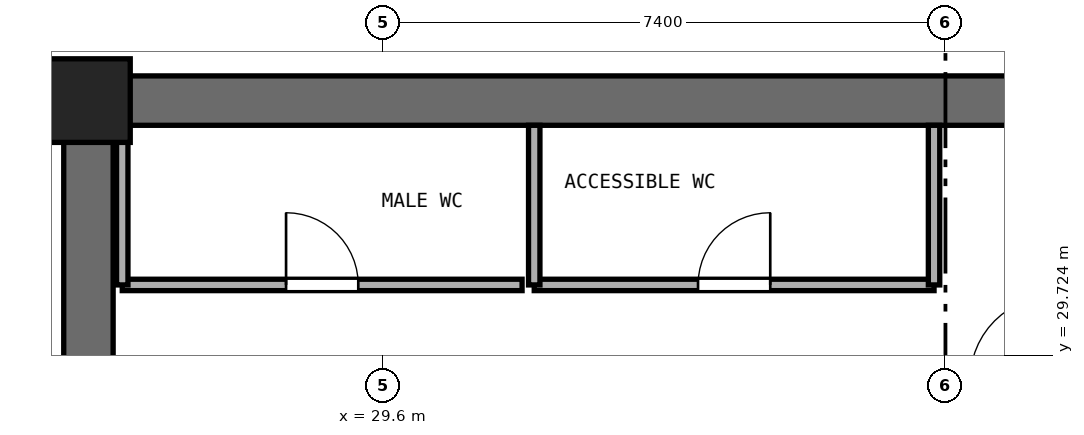
"""IFC4 building model, lengths in metres.
Left out: names, types, materials, properties, quantities, classifications, styles, units other than length and angle.
Written with IfcOpenShell. Run it as: python <this file> out.ifc"""

import sys

from ifc_helpers import new_model, si_unit, direction, frame, frame_2d, origin, origin_2d, place, context, subcontext, project, spatial, rectangle, extrude, element, fill, save


model = new_model("IFC4")
c1 = context("Model", 3, precision=1e-05, world=origin(), true_north=direction((0.0, 1.0)))
c2 = subcontext(c1, "Body", "Model", "MODEL_VIEW")
j1 = project(units=[si_unit("LENGTHUNIT", "METRE"), si_unit("PLANEANGLEUNIT", "RADIAN")], contexts=[c1])
p1 = place(None, origin())
s1 = spatial("IfcSite", under=j1, at=p1, CompositionType="ELEMENT")
p2 = place(p1, origin())
s2 = spatial("IfcBuilding", under=s1, at=p2, CompositionType="ELEMENT")
p3 = place(p2, frame((0.0, 0.0, 15.0)))
s3 = spatial("IfcBuildingStorey", under=s2, at=p3, CompositionType="ELEMENT", Elevation=15.0)
p4 = place(p3, frame((25.4, 33.075, 0.0), z_axis=(0.0, 0.0, 1.0), x_axis=(1.0, 0.0, 0.0)))
e1 = element("IfcWall", 1, at=p4, inside=s3, PredefinedType="SHEAR", context=c2, shape_type="SweptSolid", body=[
    extrude(rectangle(XDim=23.2, YDim=0.65, at=frame_2d((11.6, 0.0))), origin(), (0.0, 0.0, 1.0), 4.68),
])
p5 = place(p3, frame((25.725, 17.65, 0.0), z_axis=(0.0, 0.0, 1.0), x_axis=(0.0, 1.0, 0.0)))
e2 = element("IfcWall", 2, at=p5, inside=s3, PredefinedType="SHEAR", context=c2, shape_type="SweptSolid", body=[
    extrude(rectangle(XDim=15.1, YDim=0.65, at=frame_2d((7.55, 0.0))), origin(), (0.0, 0.0, 1.0), 4.68),
])
p6 = place(p5, frame((6.8, 0.0, 0.0)))
e3 = element("IfcOpeningElement", 3, at=p6, cuts=e2, PredefinedType="OPENING", context=c2, shape_type="SweptSolid", body=[
    extrude(rectangle(XDim=1.5, YDim=2.15, at=frame_2d((0.75, 1.075))), frame((0.0, 0.335, 0.0), z_axis=(0.0, -1.0, 0.0), x_axis=(1.0, 0.0, 0.0)), (0.0, 0.0, 1.0), 0.67),
])
p7 = place(p3, frame((25.725, 33.075, 0.0), z_axis=(0.0, 0.0, 1.0), x_axis=(1.0, 0.0, 0.0)))
e4 = element("IfcColumn", 4, at=p7, inside=s3, PredefinedType="PILASTER", context=c2, shape_type="SweptSolid", body=[
    extrude(rectangle(XDim=1.1, YDim=1.1, at=origin_2d()), origin(), (0.0, 0.0, 1.0), 5.0),
])
p8 = place(p3, frame((26.17, 30.65, 0.0), z_axis=(0.0, 0.0, 1.0), x_axis=(1.0, 0.0, 0.0)))
e5 = element("IfcWall", 5, at=p8, inside=s3, PredefinedType="PARTITIONING", context=c2, shape_type="SweptSolid", body=[
    extrude(rectangle(XDim=5.26, YDim=0.15, at=frame_2d((2.63, 0.0))), origin(), (0.0, 0.0, 1.0), 4.68),
])
p9 = place(p8, frame((2.155, 0.0, 0.0)))
e6 = element("IfcOpeningElement", 6, at=p9, cuts=e5, PredefinedType="OPENING", context=c2, shape_type="SweptSolid", body=[
    extrude(rectangle(XDim=0.95, YDim=2.1, at=frame_2d((0.475, 1.05))), frame((0.0, 0.085, 0.0), z_axis=(0.0, -1.0, 0.0), x_axis=(1.0, 0.0, 0.0)), (0.0, 0.0, 1.0), 0.17),
])
p10 = place(p3, frame((26.17, 30.65, 0.0), z_axis=(0.0, 0.0, 1.0), x_axis=(0.0, 1.0, 0.0)))
e7 = element("IfcWall", 7, at=p10, inside=s3, PredefinedType="PARTITIONING", context=c2, shape_type="SweptSolid", body=[
    extrude(rectangle(XDim=2.1, YDim=0.15, at=frame_2d((1.05, 0.0))), origin(), (0.0, 0.0, 1.0), 4.68),
])
p11 = place(p3, frame((31.59, 30.65, 0.0), z_axis=(0.0, 0.0, 1.0), x_axis=(1.0, 0.0, 0.0)))
e8 = element("IfcWall", 8, at=p11, inside=s3, PredefinedType="PARTITIONING", context=c2, shape_type="SweptSolid", body=[
    extrude(rectangle(XDim=5.26, YDim=0.15, at=frame_2d((2.63, 0.0))), origin(), (0.0, 0.0, 1.0), 4.68),
])
p12 = place(p11, frame((2.155, 0.0, 0.0)))
e9 = element("IfcOpeningElement", 9, at=p12, cuts=e8, PredefinedType="OPENING", context=c2, shape_type="SweptSolid", body=[
    extrude(rectangle(XDim=0.95, YDim=2.1, at=frame_2d((0.475, 1.05))), frame((0.0, 0.085, 0.0), z_axis=(0.0, -1.0, 0.0), x_axis=(1.0, 0.0, 0.0)), (0.0, 0.0, 1.0), 0.17),
])
for number, where, z_axis, x_axis in (
    (10, (31.59, 30.65, 0.0), (0.0, 0.0, 1.0), (0.0, 1.0, 0.0)),
    (11, (36.85, 30.65, 0.0), (0.0, 0.0, 1.0), (0.0, 1.0, 0.0)),
):
    element("IfcWall", number, at=place(p3, frame(where, z_axis=z_axis, x_axis=x_axis)), inside=s3, PredefinedType="PARTITIONING", context=c2, shape_type="SweptSolid", body=[
        extrude(rectangle(XDim=2.1, YDim=0.15, at=frame_2d((1.05, 0.0))), origin(), (0.0, 0.0, 1.0), 4.68),
    ])
p13 = place(p9, origin())
e12 = element("IfcDoor", 12, at=p13, inside=s3, OperationType="SINGLE_SWING_LEFT", PredefinedType="DOOR", context=c2, shape_type="SweptSolid", body=[
    extrude(rectangle(XDim=0.95, YDim=2.1, at=frame_2d((0.475, 1.05))), frame((0.0, 0.025, 0.0), z_axis=(0.0, -1.0, 0.0), x_axis=(1.0, 0.0, 0.0)), (0.0, 0.0, 1.0), 0.05),
])
fill(e6, e12)
p14 = place(p12, origin())
e13 = element("IfcDoor", 13, at=p14, inside=s3, OperationType="SINGLE_SWING_RIGHT", PredefinedType="DOOR", context=c2, shape_type="SweptSolid", body=[
    extrude(rectangle(XDim=0.95, YDim=2.1, at=frame_2d((0.475, 1.05))), frame((0.0, 0.025, 0.0), z_axis=(0.0, -1.0, 0.0), x_axis=(1.0, 0.0, 0.0)), (0.0, 0.0, 1.0), 0.05),
])
fill(e9, e13)
save(model, sys.argv[1])
